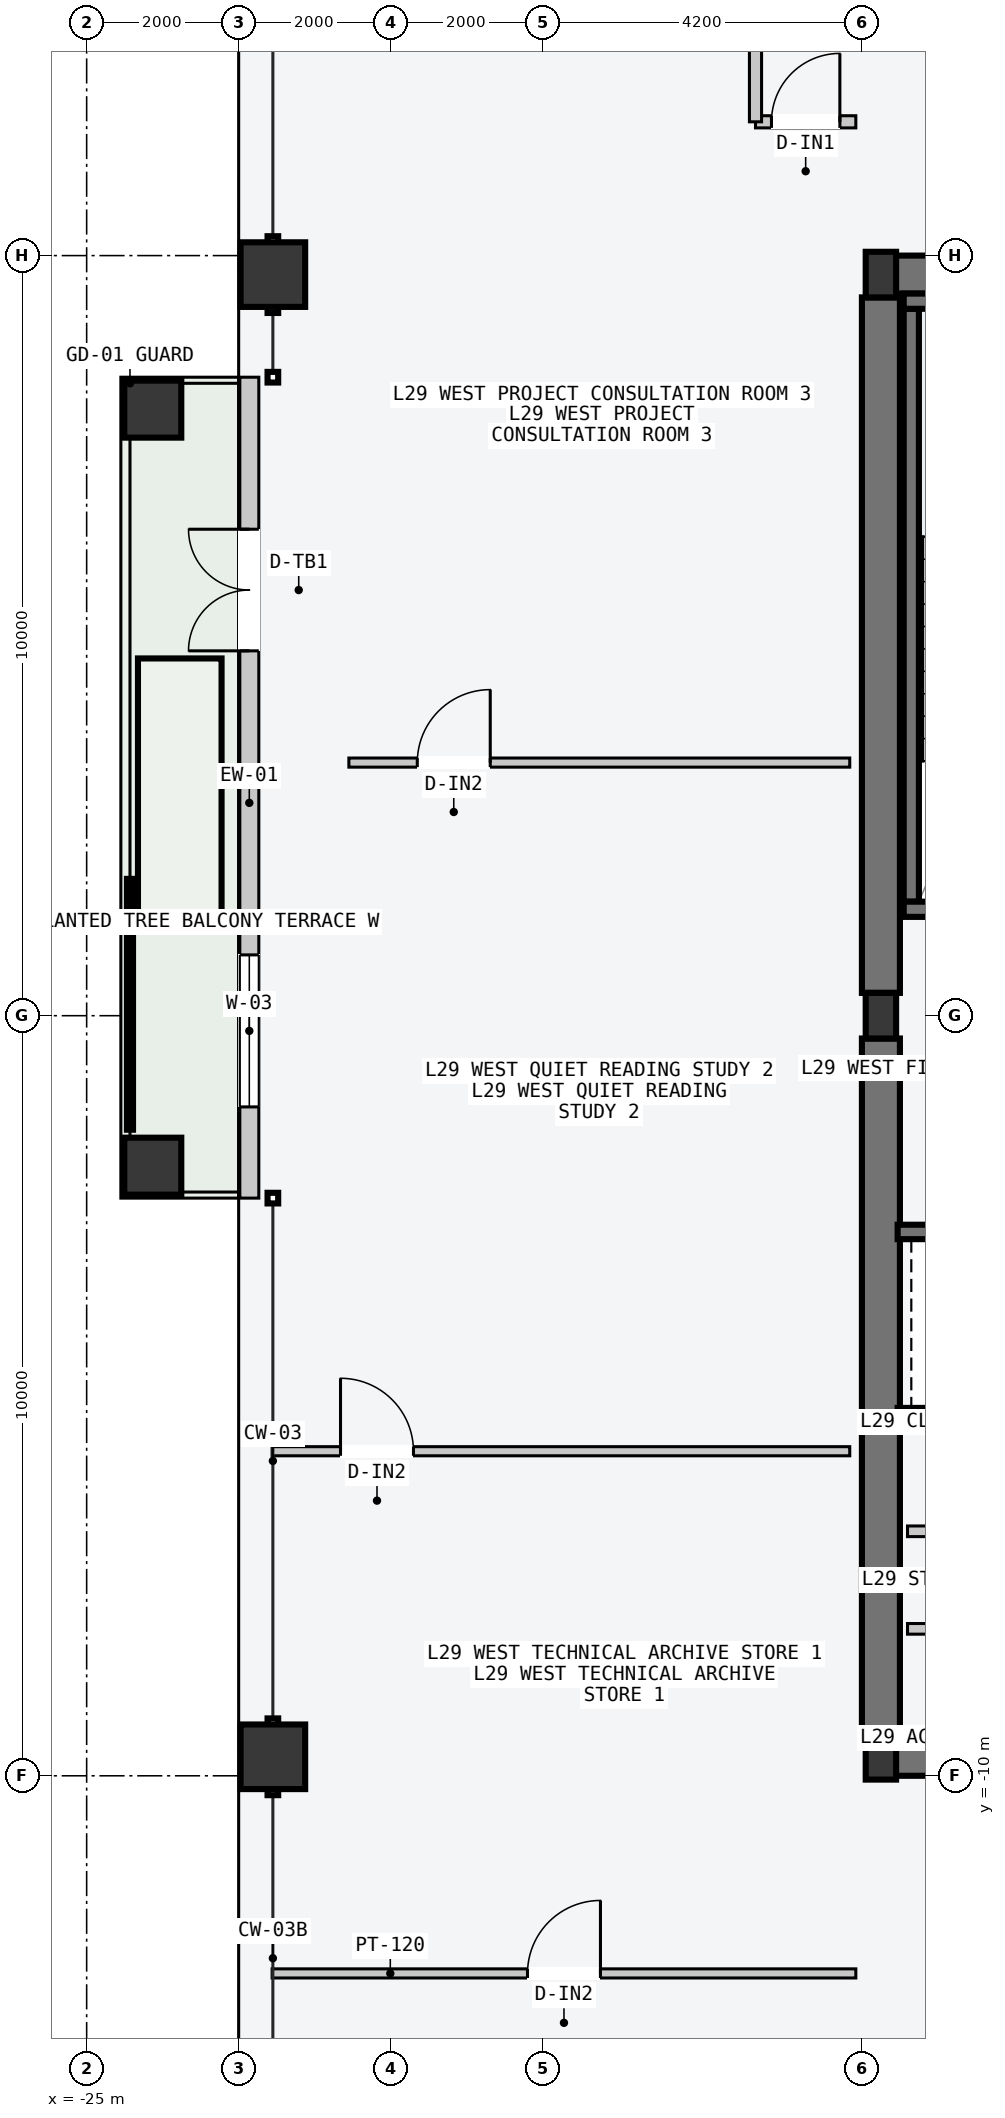
"""IFC4 building model, lengths in metres.
Left out: names, types, materials, properties, quantities, classifications, styles, units other than length and angle.
Written with IfcOpenShell. Run it as: python <this file> out.ifc"""

import sys

from ifc_helpers import new_model, si_unit, direction, frame, frame_2d, origin, origin_2d, place, context, subcontext, project, spatial, rectangle, hollow_rectangle, i_section, extrude, element, fill, save


model = new_model("IFC4")
c1 = context("Model", 3, precision=1e-05, world=origin(), true_north=direction((0.0, 1.0)))
c2 = subcontext(c1, "Body", "Model", "MODEL_VIEW")
j1 = project(units=[si_unit("LENGTHUNIT", "METRE"), si_unit("PLANEANGLEUNIT", "RADIAN")], contexts=[c1])
p1 = place(None, origin())
s1 = spatial("IfcSite", under=j1, at=p1, CompositionType="ELEMENT")
p2 = place(p1, origin())
s2 = spatial("IfcBuilding", under=s1, at=p2, CompositionType="ELEMENT")
p3 = place(p2, frame((0.0, 0.0, 113.4)))
s3 = spatial("IfcBuildingStorey", under=s2, at=p3, CompositionType="ELEMENT", Elevation=113.4)
for number, where, z_axis, x_axis in (
    (1, (-14.53, -9.75, -0.2), (0.0, 0.0, 1.0), (1.0, 0.0, 0.0)),
    (2, (-14.53, 9.75, -0.2), (0.0, 0.0, 1.0), (1.0, 0.0, 0.0)),
):
    element("IfcWall", number, at=place(p3, frame(where, z_axis=z_axis, x_axis=x_axis)), inside=s3, PredefinedType="SHEAR", context=c2, shape_type="SweptSolid", body=[
        extrude(rectangle(XDim=6.46, YDim=0.5, at=frame_2d((3.23, 0.0))), origin(), (0.0, 0.0, 1.0), 3.6),
    ])
for number, where, z_axis, x_axis in (
    (3, (-14.55, -9.45, -0.2), (0.0, 0.0, 1.0), (0.0, 1.0, 0.0)),
    (4, (-14.55, 0.3, -0.2), (0.0, 0.0, 1.0), (0.0, 1.0, 0.0)),
):
    element("IfcWall", number, at=place(p3, frame(where, z_axis=z_axis, x_axis=x_axis)), inside=s3, PredefinedType="SHEAR", context=c2, shape_type="SweptSolid", body=[
        extrude(rectangle(XDim=9.15, YDim=0.5, at=frame_2d((4.575, 0.0))), origin(), (0.0, 0.0, 1.0), 3.6),
    ])
p4 = place(p3, frame((-14.15, 1.5, -0.2), z_axis=(0.0, 0.0, 1.0), x_axis=(0.0, 1.0, 0.0)))
e5 = element("IfcWall", 5, at=p4, inside=s3, PredefinedType="SOLIDWALL", context=c2, shape_type="SweptSolid", body=[
    extrude(rectangle(XDim=7.8, YDim=0.2, at=frame_2d((3.9, 0.0))), origin(), (0.0, 0.0, 1.0), 3.6),
])
p5 = place(p3, frame((-14.25, 1.4, -0.2), z_axis=(0.0, 0.0, 1.0), x_axis=(1.0, 0.0, 0.0)))
e6 = element("IfcWall", 6, at=p5, inside=s3, PredefinedType="SOLIDWALL", context=c2, shape_type="SweptSolid", body=[
    extrude(rectangle(XDim=3.72, YDim=0.2, at=frame_2d((1.86, 0.0))), origin(), (0.0, 0.0, 1.0), 3.6),
])
p6 = place(p5, frame((1.5, 0.0, 0.2)))
e7 = element("IfcOpeningElement", 7, at=p6, cuts=e6, PredefinedType="OPENING", context=c2, shape_type="SweptSolid", body=[
    extrude(rectangle(XDim=1.12, YDim=2.18, at=frame_2d((0.56, 1.09))), frame((0.0, 0.11, 0.0), z_axis=(0.0, -1.0, 0.0), x_axis=(1.0, 0.0, 0.0)), (0.0, 0.0, 1.0), 0.22),
])
p7 = place(p3, frame((-14.25, 9.4, -0.2), z_axis=(0.0, 0.0, 1.0), x_axis=(1.0, 0.0, 0.0)))
e8 = element("IfcWall", 8, at=p7, inside=s3, PredefinedType="SOLIDWALL", context=c2, shape_type="SweptSolid", body=[
    extrude(rectangle(XDim=3.72, YDim=0.2, at=frame_2d((1.86, 0.0))), origin(), (0.0, 0.0, 1.0), 3.6),
])
for number, where, z_axis, x_axis in (
    (9, (-14.55, -9.75, 0.0), (0.0, 0.0, 1.0), (1.0, 0.0, 0.0)),
    (10, (-14.55, 0.0, 0.0), (0.0, 0.0, 1.0), (1.0, 0.0, 0.0)),
    (11, (-14.55, 9.75, 0.0), (0.0, 0.0, 1.0), (1.0, 0.0, 0.0)),
):
    element("IfcColumn", number, at=place(p3, frame(where, z_axis=z_axis, x_axis=x_axis)), inside=s3, PredefinedType="COLUMN", context=c2, shape_type="SweptSolid", body=[
        extrude(i_section(OverallWidth=0.4, OverallDepth=0.6, WebThickness=0.022, FlangeThickness=0.036, at=origin_2d()), origin(), (0.0, 0.0, 1.0), 3.6),
    ])
for number, where, z_axis, x_axis in (
    (12, (-22.55, -9.75, 0.0), (0.0, 0.0, 1.0), (0.0, 1.0, 0.0)),
    (13, (-22.55, 9.75, 0.0), (0.0, 0.0, 1.0), (0.0, 1.0, 0.0)),
):
    element("IfcColumn", number, at=place(p3, frame(where, z_axis=z_axis, x_axis=x_axis)), inside=s3, PredefinedType="COLUMN", context=c2, shape_type="SweptSolid", body=[
        extrude(hollow_rectangle(XDim=0.85, YDim=0.85, WallThickness=0.04, at=origin_2d()), origin(), (0.0, 0.0, 1.0), 3.6),
    ])
for number, where, z_axis, x_axis in (
    (14, (-24.13, -1.98, 0.0), (0.0, 0.0, 1.0), (0.0, 1.0, 0.0)),
    (15, (-24.13, 7.98, 0.0), (0.0, 0.0, 1.0), (0.0, 1.0, 0.0)),
):
    element("IfcColumn", number, at=place(p3, frame(where, z_axis=z_axis, x_axis=x_axis)), inside=s3, PredefinedType="COLUMN", context=c2, shape_type="SweptSolid", body=[
        extrude(hollow_rectangle(XDim=0.75, YDim=0.75, WallThickness=0.032, at=origin_2d()), origin(), (0.0, 0.0, 1.0), 3.6),
    ])
p8 = place(p3, frame((-22.86, -2.4, 0.0), z_axis=(0.0, 0.0, 1.0), x_axis=(0.0, 1.0, 0.0)))
e16 = element("IfcWall", 16, at=p8, inside=s3, PredefinedType="STANDARD", context=c2, shape_type="SweptSolid", body=[
    extrude(rectangle(XDim=10.8, YDim=0.25, at=frame_2d((5.4, 0.0))), origin(), (0.0, 0.0, 1.0), 3.4),
])
p9 = place(p8, frame((7.2, 0.0, 0.0)))
e17 = element("IfcOpeningElement", 17, at=p9, cuts=e16, PredefinedType="OPENING", context=c2, shape_type="SweptSolid", body=[
    extrude(rectangle(XDim=1.6, YDim=2.2, at=frame_2d((0.8, 1.1))), frame((0.0, 0.135, 0.0), z_axis=(0.0, -1.0, 0.0), x_axis=(1.0, 0.0, 0.0)), (0.0, 0.0, 1.0), 0.27),
])
p10 = place(p8, frame((1.2, 0.0, 0.85)))
e18 = element("IfcOpeningElement", 18, at=p10, cuts=e16, PredefinedType="OPENING", context=c2, shape_type="SweptSolid", body=[
    extrude(rectangle(XDim=2.0, YDim=2.1, at=frame_2d((1.0, 1.05))), frame((0.0, 0.135, 0.0), z_axis=(0.0, -1.0, 0.0), x_axis=(1.0, 0.0, 0.0)), (0.0, 0.0, 1.0), 0.27),
])
p11 = place(p3, frame((-14.33, -2.845, -0.2), z_axis=(0.0, 0.0, 1.0), x_axis=(1.0, 0.0, 0.0)))
e19 = element("IfcWall", 19, at=p11, inside=s3, PredefinedType="SOLIDWALL", context=c2, shape_type="SweptSolid", body=[
    extrude(rectangle(XDim=2.68, YDim=0.19, at=frame_2d((1.34, 0.0))), origin(), (0.0, 0.0, 1.0), 3.6),
])
p12 = place(p11, frame((0.83, 0.0, 0.2)))
e20 = element("IfcOpeningElement", 20, at=p12, cuts=e19, PredefinedType="OPENING", context=c2, shape_type="SweptSolid", body=[
    extrude(rectangle(XDim=1.2, YDim=2.2, at=frame_2d((0.6, 1.1))), frame((0.0, 0.105, 0.0), z_axis=(0.0, -1.0, 0.0), x_axis=(1.0, 0.0, 0.0)), (0.0, 0.0, 1.0), 0.21),
])
p13 = place(p3, frame((-14.33, -5.255, -0.2), z_axis=(0.0, 0.0, 1.0), x_axis=(1.0, 0.0, 0.0)))
e21 = element("IfcWall", 21, at=p13, inside=s3, PredefinedType="SOLIDWALL", context=c2, shape_type="SweptSolid", body=[
    extrude(rectangle(XDim=2.68, YDim=0.19, at=frame_2d((1.34, 0.0))), origin(), (0.0, 0.0, 1.0), 3.6),
])
for number, where, z_axis, x_axis in (
    (22, (-11.7, -8.067, 0.0), (0.0, 0.0, 1.0), (-1.0, 0.0, 0.0)),
    (23, (-11.7, -6.783, 0.0), (0.0, 0.0, 1.0), (-1.0, 0.0, 0.0)),
):
    element("IfcWall", number, at=place(p3, frame(where, z_axis=z_axis, x_axis=x_axis)), inside=s3, PredefinedType="PARTITIONING", context=c2, shape_type="SweptSolid", body=[
        extrude(rectangle(XDim=2.5, YDim=0.14, at=frame_2d((1.25, 0.0))), origin(), (0.0, 0.0, 1.0), 3.4),
    ])
p14 = place(p3, frame((-22.56, -12.6, 0.0), z_axis=(0.0, 0.0, 1.0), x_axis=(1.0, 0.0, 0.0)))
e24 = element("IfcWall", 24, at=p14, inside=s3, PredefinedType="PARTITIONING", context=c2, shape_type="SweptSolid", body=[
    extrude(rectangle(XDim=7.68, YDim=0.12, at=frame_2d((3.84, 0.0))), origin(), (0.0, 0.0, 1.0), 3.4),
])
p15 = place(p14, frame((3.36, 0.0, 0.0)))
e25 = element("IfcOpeningElement", 25, at=p15, cuts=e24, PredefinedType="OPENING", context=c2, shape_type="SweptSolid", body=[
    extrude(rectangle(XDim=0.96, YDim=2.18, at=frame_2d((0.48, 1.09))), frame((0.0, 0.07, 0.0), z_axis=(0.0, -1.0, 0.0), x_axis=(1.0, 0.0, 0.0)), (0.0, 0.0, 1.0), 0.14),
])
p16 = place(p3, frame((-16.2, 11.76, 0.0), z_axis=(0.0, 0.0, 1.0), x_axis=(1.0, 0.0, 0.0)))
e26 = element("IfcWall", 26, at=p16, inside=s3, PredefinedType="PARTITIONING", context=c2, shape_type="SweptSolid", body=[
    extrude(rectangle(XDim=1.32, YDim=0.16, at=frame_2d((0.66, 0.0))), origin(), (0.0, 0.0, 1.0), 3.4),
])
p17 = place(p16, frame((0.21, 0.0, 0.0)))
e27 = element("IfcOpeningElement", 27, at=p17, cuts=e26, PredefinedType="OPENING", context=c2, shape_type="SweptSolid", body=[
    extrude(rectangle(XDim=0.9, YDim=2.15, at=frame_2d((0.45, 1.075))), frame((0.0, 0.09, 0.0), z_axis=(0.0, -1.0, 0.0), x_axis=(1.0, 0.0, 0.0)), (0.0, 0.0, 1.0), 0.18),
])
p18 = place(p3, frame((-16.2, 11.76, 0.0), z_axis=(0.0, 0.0, 1.0), x_axis=(0.0, 1.0, 0.0)))
e28 = element("IfcWall", 28, at=p18, inside=s3, PredefinedType="PARTITIONING", context=c2, shape_type="SweptSolid", body=[
    extrude(rectangle(XDim=1.95, YDim=0.16, at=frame_2d((0.975, 0.0))), origin(), (0.0, 0.0, 1.0), 3.4),
])
p19 = place(p3, frame((-22.56, -5.73, 0.0), z_axis=(0.0, 0.0, 1.0), x_axis=(1.0, 0.0, 0.0)))
e29 = element("IfcWall", 29, at=p19, inside=s3, PredefinedType="PARTITIONING", context=c2, shape_type="SweptSolid", body=[
    extrude(rectangle(XDim=7.6, YDim=0.12, at=frame_2d((3.8, 0.0))), origin(), (0.0, 0.0, 1.0), 3.4),
])
p20 = place(p19, frame((0.9, 0.0, 0.0)))
e30 = element("IfcOpeningElement", 30, at=p20, cuts=e29, PredefinedType="OPENING", context=c2, shape_type="SweptSolid", body=[
    extrude(rectangle(XDim=0.96, YDim=2.18, at=frame_2d((0.48, 1.09))), frame((0.0, 0.07, 0.0), z_axis=(0.0, -1.0, 0.0), x_axis=(1.0, 0.0, 0.0)), (0.0, 0.0, 1.0), 0.14),
])
p21 = place(p3, frame((-21.55, 3.33, 0.0), z_axis=(0.0, 0.0, 1.0), x_axis=(1.0, 0.0, 0.0)))
e31 = element("IfcWall", 31, at=p21, inside=s3, PredefinedType="PARTITIONING", context=c2, shape_type="SweptSolid", body=[
    extrude(rectangle(XDim=6.59, YDim=0.12, at=frame_2d((3.295, 0.0))), origin(), (0.0, 0.0, 1.0), 3.0),
])
p22 = place(p21, frame((0.9, 0.0, 0.0)))
e32 = element("IfcOpeningElement", 32, at=p22, cuts=e31, PredefinedType="OPENING", context=c2, shape_type="SweptSolid", body=[
    extrude(rectangle(XDim=0.96, YDim=2.18, at=frame_2d((0.48, 1.09))), frame((0.0, 0.07, 0.0), z_axis=(0.0, -1.0, 0.0), x_axis=(1.0, 0.0, 0.0)), (0.0, 0.0, 1.0), 0.14),
])
p23 = place(p9, origin())
e33 = element("IfcDoor", 33, at=p23, inside=s3, OperationType="DOUBLE_DOOR_SINGLE_SWING", PredefinedType="DOOR", context=c2, shape_type="SweptSolid", body=[
    extrude(rectangle(XDim=1.6, YDim=2.2, at=frame_2d((0.8, 1.1))), frame((0.0, 0.025, 0.0), z_axis=(0.0, -1.0, 0.0), x_axis=(1.0, 0.0, 0.0)), (0.0, 0.0, 1.0), 0.05),
])
fill(e17, e33)
p24 = place(p10, origin())
e34 = element("IfcWindow", 34, at=p24, inside=s3, PartitioningType="SINGLE_PANEL", PredefinedType="WINDOW", context=c2, shape_type="SweptSolid", body=[
    extrude(rectangle(XDim=2.0, YDim=2.1, at=frame_2d((1.0, 1.05))), frame((0.0, 0.03, 0.0), z_axis=(0.0, -1.0, 0.0), x_axis=(1.0, 0.0, 0.0)), (0.0, 0.0, 1.0), 0.06),
])
fill(e18, e34)
p25 = place(p15, origin())
e35 = element("IfcDoor", 35, at=p25, inside=s3, OperationType="SINGLE_SWING_RIGHT", PredefinedType="DOOR", context=c2, shape_type="SweptSolid", body=[
    extrude(rectangle(XDim=0.96, YDim=2.18, at=frame_2d((0.48, 1.09))), frame((0.0, 0.025, 0.0), z_axis=(0.0, -1.0, 0.0), x_axis=(1.0, 0.0, 0.0)), (0.0, 0.0, 1.0), 0.05),
])
fill(e25, e35)
p26 = place(p17, origin())
e36 = element("IfcDoor", 36, at=p26, inside=s3, OperationType="SINGLE_SWING_RIGHT", PredefinedType="DOOR", context=c2, shape_type="SweptSolid", body=[
    extrude(rectangle(XDim=0.9, YDim=2.15, at=frame_2d((0.45, 1.075))), frame((0.0, 0.025, 0.0), z_axis=(0.0, -1.0, 0.0), x_axis=(1.0, 0.0, 0.0)), (0.0, 0.0, 1.0), 0.05),
])
fill(e27, e36)
p27 = place(p20, origin())
e37 = element("IfcDoor", 37, at=p27, inside=s3, OperationType="SINGLE_SWING_LEFT", PredefinedType="DOOR", context=c2, shape_type="SweptSolid", body=[
    extrude(rectangle(XDim=0.96, YDim=2.18, at=frame_2d((0.48, 1.09))), frame((0.0, 0.025, 0.0), z_axis=(0.0, -1.0, 0.0), x_axis=(1.0, 0.0, 0.0)), (0.0, 0.0, 1.0), 0.05),
])
fill(e30, e37)
p28 = place(p22, origin())
e38 = element("IfcDoor", 38, at=p28, inside=s3, OperationType="SINGLE_SWING_RIGHT", PredefinedType="DOOR", context=c2, shape_type="SweptSolid", body=[
    extrude(rectangle(XDim=0.96, YDim=2.18, at=frame_2d((0.48, 1.09))), frame((0.0, 0.025, 0.0), z_axis=(0.0, -1.0, 0.0), x_axis=(1.0, 0.0, 0.0)), (0.0, 0.0, 1.0), 0.05),
])
fill(e32, e38)
save(model, sys.argv[1])
